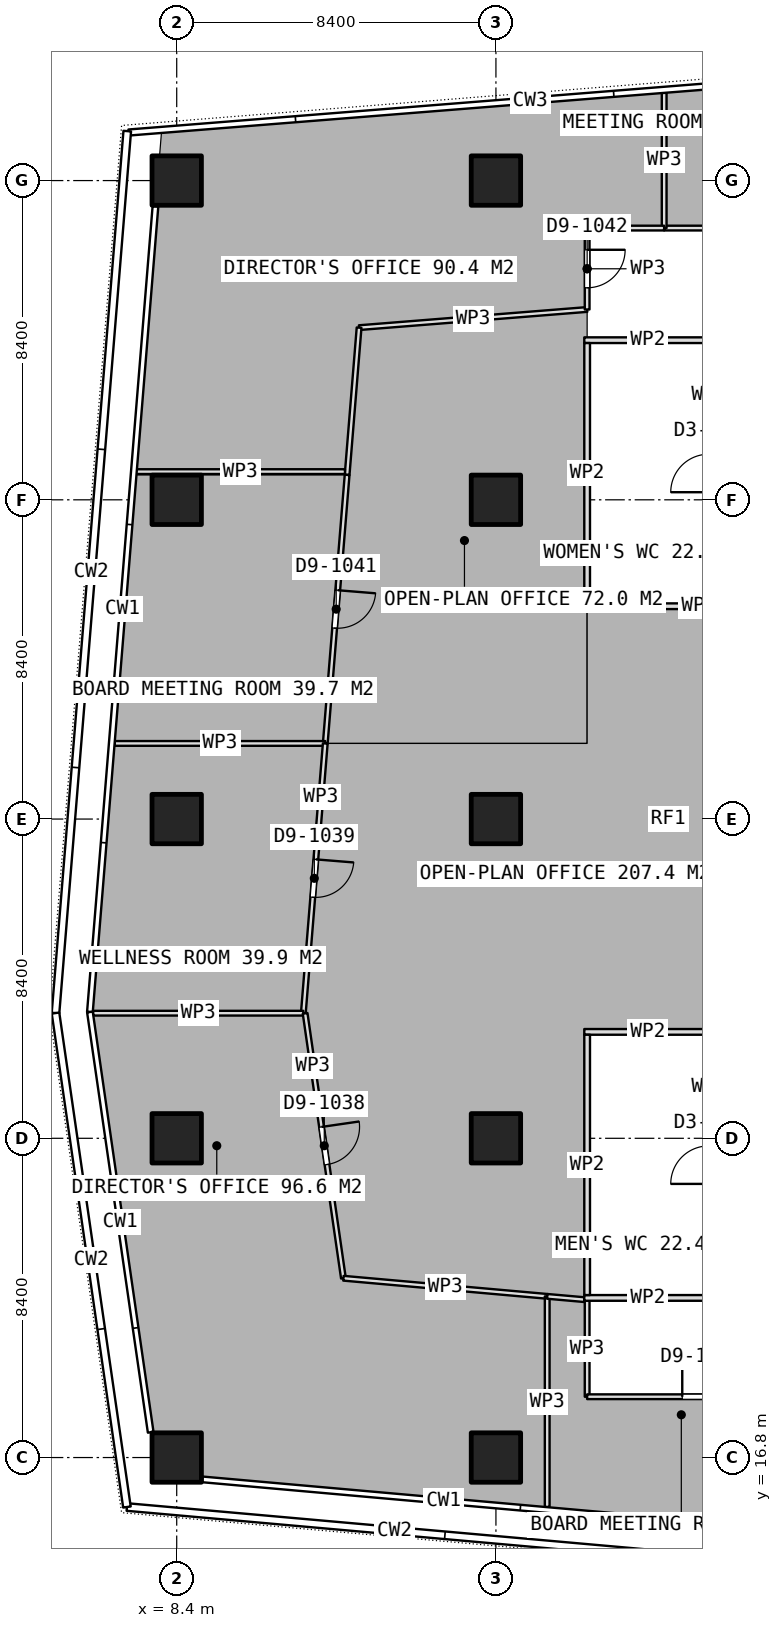
"""IFC4 building model, lengths in metres.
Left out: names, types, materials, properties, quantities, classifications, styles, units other than length and angle.
Written with IfcOpenShell. Run it as: python <this file> out.ifc"""

import sys

from ifc_helpers import new_model, si_unit, direction, frame, frame_2d, origin, origin_2d, place, context, subcontext, project, spatial, rectangle, extrude, element, fill, save


model = new_model("IFC4")
c1 = context("Model", 3, precision=1e-05, world=origin(), true_north=direction((0.0, 1.0)))
c2 = subcontext(c1, "Body", "Model", "MODEL_VIEW")
j1 = project(units=[si_unit("LENGTHUNIT", "METRE"), si_unit("PLANEANGLEUNIT", "RADIAN")], contexts=[c1])
p1 = place(None, origin())
s1 = spatial("IfcSite", under=j1, at=p1, CompositionType="ELEMENT")
p2 = place(p1, origin())
s2 = spatial("IfcBuilding", under=s1, at=p2, CompositionType="ELEMENT")
p3 = place(p2, frame((0.0, 0.0, 280.1)))
s3 = spatial("IfcBuildingStorey", under=s2, at=p3, CompositionType="ELEMENT", Elevation=280.1)
for number, where, z_axis, x_axis in (
    (1, (8.4, 16.8, 0.0), (0.0, 0.0, 1.0), (1.0, 0.0, 0.0)),
    (2, (8.4, 25.2, 0.0), (0.0, 0.0, 1.0), (1.0, 0.0, 0.0)),
    (3, (8.4, 33.6, 0.0), (0.0, 0.0, 1.0), (1.0, 0.0, 0.0)),
    (4, (8.4, 42.0, 0.0), (0.0, 0.0, 1.0), (1.0, 0.0, 0.0)),
    (5, (8.4, 50.4, 0.0), (0.0, 0.0, 1.0), (1.0, 0.0, 0.0)),
    (6, (16.8, 16.8, 0.0), (0.0, 0.0, 1.0), (1.0, 0.0, 0.0)),
    (7, (16.8, 25.2, 0.0), (0.0, 0.0, 1.0), (1.0, 0.0, 0.0)),
    (8, (16.8, 33.6, 0.0), (0.0, 0.0, 1.0), (1.0, 0.0, 0.0)),
    (9, (16.8, 42.0, 0.0), (0.0, 0.0, 1.0), (1.0, 0.0, 0.0)),
    (10, (16.8, 50.4, 0.0), (0.0, 0.0, 1.0), (1.0, 0.0, 0.0)),
):
    element("IfcColumn", number, at=place(p3, frame(where, z_axis=z_axis, x_axis=x_axis)), inside=s3, PredefinedType="COLUMN", context=c2, shape_type="SweptSolid", body=[
        extrude(rectangle(XDim=1.3, YDim=1.3, at=origin_2d()), origin(), (0.0, 0.0, 1.0), 3.75),
    ])
for number, where, z_axis, x_axis in (
    (11, (19.125, 39.2, 0.0), (0.0, 0.0, 1.0), (1.0, 0.0, 0.0)),
    (12, (19.125, 46.2, 0.0), (0.0, 0.0, 1.0), (1.0, 0.0, 0.0)),
):
    element("IfcWall", number, at=place(p3, frame(where, z_axis=z_axis, x_axis=x_axis)), inside=s3, PredefinedType="PARTITIONING", context=c2, shape_type="SweptSolid", body=[
        extrude(rectangle(XDim=3.35, YDim=0.15, at=frame_2d((1.675, 0.0))), origin(), (0.0, 0.0, 1.0), 3.5),
    ])
p4 = place(p3, frame((19.2, 39.275, 0.0), z_axis=(0.0, 0.0, 1.0), x_axis=(0.0, 1.0, 0.0)))
e13 = element("IfcWall", 13, at=p4, inside=s3, PredefinedType="PARTITIONING", context=c2, shape_type="SweptSolid", body=[
    extrude(rectangle(XDim=6.85, YDim=0.15, at=frame_2d((3.425, 0.0))), origin(), (0.0, 0.0, 1.0), 3.5),
])
for number, where, z_axis, x_axis in (
    (14, (19.125, 21.0, 0.0), (0.0, 0.0, 1.0), (1.0, 0.0, 0.0)),
    (15, (19.125, 28.0, 0.0), (0.0, 0.0, 1.0), (1.0, 0.0, 0.0)),
):
    element("IfcWall", number, at=place(p3, frame(where, z_axis=z_axis, x_axis=x_axis)), inside=s3, PredefinedType="PARTITIONING", context=c2, shape_type="SweptSolid", body=[
        extrude(rectangle(XDim=3.35, YDim=0.15, at=frame_2d((1.675, 0.0))), origin(), (0.0, 0.0, 1.0), 3.5),
    ])
p5 = place(p3, frame((19.2, 21.075, 0.0), z_axis=(0.0, 0.0, 1.0), x_axis=(0.0, 1.0, 0.0)))
e16 = element("IfcWall", 16, at=p5, inside=s3, PredefinedType="PARTITIONING", context=c2, shape_type="SweptSolid", body=[
    extrude(rectangle(XDim=6.85, YDim=0.15, at=frame_2d((3.425, 0.0))), origin(), (0.0, 0.0, 1.0), 3.5),
])
p6 = place(p3, frame((25.205, 49.15, 0.0), z_axis=(0.0, 0.0, 1.0), x_axis=(-1.0, 0.0, 0.0)))
e17 = element("IfcWall", 17, at=p6, inside=s3, PredefinedType="PARTITIONING", context=c2, shape_type="SweptSolid", body=[
    extrude(rectangle(XDim=3.978, YDim=0.125, at=frame_2d((1.989, 0.0))), origin(), (0.0, 0.0, 1.0), 3.5),
])
p7 = place(p3, frame((21.227, 49.15, 0.0), z_axis=(0.0, 0.0, 1.0), x_axis=(0.0, 1.0, 0.0)))
e18 = element("IfcWall", 18, at=p7, inside=s3, PredefinedType="PARTITIONING", context=c2, shape_type="SweptSolid", body=[
    extrude(rectangle(XDim=3.558, YDim=0.125, at=frame_2d((1.779, 0.0))), origin(), (0.0, 0.0, 1.0), 3.5),
])
p8 = place(p3, frame((19.2, 47.008, 0.0), z_axis=(0.0, 0.0, 1.0), x_axis=(-0.996842300725, -0.079406721921, 0.0)))
e19 = element("IfcWall", 19, at=p8, inside=s3, PredefinedType="PARTITIONING", context=c2, shape_type="SweptSolid", body=[
    extrude(rectangle(XDim=6.02, YDim=0.125, at=frame_2d((3.01, 0.0))), origin(), (0.0, 0.0, 1.0), 3.5),
])
p9 = place(p3, frame((13.199, 46.53, 0.0), z_axis=(0.0, 0.0, 1.0), x_axis=(-0.081048669132, -0.996710145043, 0.0)))
e20 = element("IfcWall", 20, at=p9, inside=s3, PredefinedType="PARTITIONING", context=c2, shape_type="SweptSolid", body=[
    extrude(rectangle(XDim=3.886, YDim=0.125, at=frame_2d((1.943, 0.0))), origin(), (0.0, 0.0, 1.0), 3.5),
])
p10 = place(p3, frame((12.828, 42.742, 0.0), z_axis=(0.0, 0.0, 1.0), x_axis=(-1.0, 0.0, 0.0)))
e21 = element("IfcWall", 21, at=p10, inside=s3, PredefinedType="PARTITIONING", context=c2, shape_type="SweptSolid", body=[
    extrude(rectangle(XDim=5.505, YDim=0.125, at=frame_2d((2.752, 0.0))), origin(), (0.0, 0.0, 1.0), 3.5),
])
p11 = place(p3, frame((21.226, 49.15, 0.0), z_axis=(0.0, 0.0, 1.0), x_axis=(-1.0, 0.0, 0.0)))
e22 = element("IfcWall", 22, at=p11, inside=s3, PredefinedType="PARTITIONING", context=c2, shape_type="SweptSolid", body=[
    extrude(rectangle(XDim=2.026, YDim=0.125, at=frame_2d((1.013, 0.0))), origin(), (0.0, 0.0, 1.0), 3.5),
])
p12 = place(p3, frame((19.2, 49.15, 0.0), z_axis=(0.0, 0.0, 1.0), x_axis=(0.0, -1.0, 0.0)))
e23 = element("IfcWall", 23, at=p12, inside=s3, PredefinedType="PARTITIONING", context=c2, shape_type="SweptSolid", body=[
    extrude(rectangle(XDim=2.142, YDim=0.125, at=frame_2d((1.071, 0.0))), origin(), (0.0, 0.0, 1.0), 3.5),
])
p13 = place(p12, frame((0.571, 0.0, 0.0)))
e24 = element("IfcOpeningElement", 24, at=p13, cuts=e23, PredefinedType="OPENING", context=c2, shape_type="SweptSolid", body=[
    extrude(rectangle(XDim=1.0, YDim=2.1, at=frame_2d((0.5, 1.05))), frame((0.0, 0.073, 0.0), z_axis=(0.0, -1.0, 0.0), x_axis=(1.0, 0.0, 0.0)), (0.0, 0.0, 1.0), 0.145),
])
p14 = place(p3, frame((12.884, 42.656, 0.0), z_axis=(0.0, 0.0, 1.0), x_axis=(-0.08110159124, -0.996705840205, 0.0)))
e25 = element("IfcWall", 25, at=p14, inside=s3, PredefinedType="PARTITIONING", context=c2, shape_type="SweptSolid", body=[
    extrude(rectangle(XDim=7.089, YDim=0.125, at=frame_2d((3.545, 0.0))), origin(), (0.0, 0.0, 1.0), 3.5),
])
p15 = place(p14, frame((3.045, 0.0, 0.0)))
e26 = element("IfcOpeningElement", 26, at=p15, cuts=e25, PredefinedType="OPENING", context=c2, shape_type="SweptSolid", body=[
    extrude(rectangle(XDim=1.0, YDim=2.1, at=frame_2d((0.5, 1.05))), frame((0.0, 0.073, 0.0), z_axis=(0.0, -1.0, 0.0), x_axis=(1.0, 0.0, 0.0)), (0.0, 0.0, 1.0), 0.145),
])
p16 = place(p3, frame((12.309, 35.59, 0.0), z_axis=(0.0, 0.0, 1.0), x_axis=(-1.0, 0.0, 0.0)))
e27 = element("IfcWall", 27, at=p16, inside=s3, PredefinedType="PARTITIONING", context=c2, shape_type="SweptSolid", body=[
    extrude(rectangle(XDim=5.538, YDim=0.125, at=frame_2d((2.769, 0.0))), origin(), (0.0, 0.0, 1.0), 3.5),
])
p17 = place(p3, frame((12.309, 35.589, 0.0), z_axis=(0.0, 0.0, 1.0), x_axis=(-0.081053384124, -0.996709761627, 0.0)))
e28 = element("IfcWall", 28, at=p17, inside=s3, PredefinedType="PARTITIONING", context=c2, shape_type="SweptSolid", body=[
    extrude(rectangle(XDim=7.121, YDim=0.125, at=frame_2d((3.56, 0.0))), origin(), (0.0, 0.0, 1.0), 3.5),
])
p18 = place(p17, frame((3.06, 0.0, 0.0)))
e29 = element("IfcOpeningElement", 29, at=p18, cuts=e28, PredefinedType="OPENING", context=c2, shape_type="SweptSolid", body=[
    extrude(rectangle(XDim=1.0, YDim=2.1, at=frame_2d((0.5, 1.05))), frame((0.0, 0.073, 0.0), z_axis=(0.0, -1.0, 0.0), x_axis=(1.0, 0.0, 0.0)), (0.0, 0.0, 1.0), 0.145),
])
p19 = place(p3, frame((11.732, 28.492, 0.0), z_axis=(0.0, 0.0, 1.0), x_axis=(-1.0, 0.0, 0.0)))
e30 = element("IfcWall", 30, at=p19, inside=s3, PredefinedType="PARTITIONING", context=c2, shape_type="SweptSolid", body=[
    extrude(rectangle(XDim=5.531, YDim=0.125, at=frame_2d((2.766, 0.0))), origin(), (0.0, 0.0, 1.0), 3.5),
])
p20 = place(p3, frame((11.779, 28.488, 0.0), z_axis=(0.0, 0.0, 1.0), x_axis=(0.143139230014, -0.989702561799, 0.0)))
e31 = element("IfcWall", 31, at=p20, inside=s3, PredefinedType="PARTITIONING", context=c2, shape_type="SweptSolid", body=[
    extrude(rectangle(XDim=7.042, YDim=0.125, at=frame_2d((3.521, 0.0))), origin(), (0.0, 0.0, 1.0), 3.5),
])
p21 = place(p20, frame((3.02, 0.0, 0.0)))
e32 = element("IfcOpeningElement", 32, at=p21, cuts=e31, PredefinedType="OPENING", context=c2, shape_type="SweptSolid", body=[
    extrude(rectangle(XDim=1.0, YDim=2.1, at=frame_2d((0.5, 1.05))), frame((0.0, 0.073, 0.0), z_axis=(0.0, -1.0, 0.0), x_axis=(1.0, 0.0, 0.0)), (0.0, 0.0, 1.0), 0.145),
])
p22 = place(p3, frame((12.787, 21.518, 0.0), z_axis=(0.0, 0.0, 1.0), x_axis=(0.996065348673, -0.088621787237, 0.0)))
e33 = element("IfcWall", 33, at=p22, inside=s3, PredefinedType="PARTITIONING", context=c2, shape_type="SweptSolid", body=[
    extrude(rectangle(XDim=5.383, YDim=0.125, at=frame_2d((2.691, 0.0))), origin(), (0.0, 0.0, 1.0), 3.5),
])
p23 = place(p3, frame((18.149, 21.041, 0.0), z_axis=(0.0, 0.0, 1.0), x_axis=(0.0, -1.0, 0.0)))
e34 = element("IfcWall", 34, at=p23, inside=s3, PredefinedType="PARTITIONING", context=c2, shape_type="SweptSolid", body=[
    extrude(rectangle(XDim=5.541, YDim=0.125, at=frame_2d((2.771, 0.0))), origin(), (0.0, 0.0, 1.0), 3.5),
])
p24 = place(p3, frame((18.15, 21.041, 0.0), z_axis=(0.0, 0.0, 1.0), x_axis=(0.996138836376, -0.087791905459, 0.0)))
e35 = element("IfcWall", 35, at=p24, inside=s3, PredefinedType="PARTITIONING", context=c2, shape_type="SweptSolid", body=[
    extrude(rectangle(XDim=0.979, YDim=0.125, at=frame_2d((0.489, 0.0))), origin(), (0.0, 0.0, 1.0), 3.5),
])
p25 = place(p3, frame((19.2, 20.925, 0.0), z_axis=(0.0, 0.0, 1.0), x_axis=(0.0, -1.0, 0.0)))
e36 = element("IfcWall", 36, at=p25, inside=s3, PredefinedType="PARTITIONING", context=c2, shape_type="SweptSolid", body=[
    extrude(rectangle(XDim=2.525, YDim=0.125, at=frame_2d((1.263, 0.0))), origin(), (0.0, 0.0, 1.0), 3.5),
])
p26 = place(p3, frame((19.2, 18.4, 0.0), z_axis=(0.0, 0.0, 1.0), x_axis=(1.0, 0.0, 0.0)))
e37 = element("IfcWall", 37, at=p26, inside=s3, PredefinedType="PARTITIONING", context=c2, shape_type="SweptSolid", body=[
    extrude(rectangle(XDim=6.006, YDim=0.125, at=frame_2d((3.003, 0.0))), origin(), (0.0, 0.0, 1.0), 3.5),
])
p27 = place(p26, frame((2.503, 0.0, 0.0)))
e38 = element("IfcOpeningElement", 38, at=p27, cuts=e37, PredefinedType="OPENING", context=c2, shape_type="SweptSolid", body=[
    extrude(rectangle(XDim=1.0, YDim=2.1, at=frame_2d((0.5, 1.05))), frame((0.0, 0.073, 0.0), z_axis=(0.0, -1.0, 0.0), x_axis=(1.0, 0.0, 0.0)), (0.0, 0.0, 1.0), 0.145),
])
p28 = place(p13, origin())
e39 = element("IfcDoor", 39, at=p28, inside=s3, OperationType="SINGLE_SWING_LEFT", PredefinedType="DOOR", context=c2, shape_type="SweptSolid", body=[
    extrude(rectangle(XDim=1.0, YDim=2.1, at=frame_2d((0.5, 1.05))), frame((0.0, 0.025, 0.0), z_axis=(0.0, -1.0, 0.0), x_axis=(1.0, 0.0, 0.0)), (0.0, 0.0, 1.0), 0.05),
])
fill(e24, e39)
p29 = place(p15, origin())
e40 = element("IfcDoor", 40, at=p29, inside=s3, OperationType="SINGLE_SWING_LEFT", PredefinedType="DOOR", context=c2, shape_type="SweptSolid", body=[
    extrude(rectangle(XDim=1.0, YDim=2.1, at=frame_2d((0.5, 1.05))), frame((0.0, 0.025, 0.0), z_axis=(0.0, -1.0, 0.0), x_axis=(1.0, 0.0, 0.0)), (0.0, 0.0, 1.0), 0.05),
])
fill(e26, e40)
p30 = place(p18, origin())
e41 = element("IfcDoor", 41, at=p30, inside=s3, OperationType="SINGLE_SWING_LEFT", PredefinedType="DOOR", context=c2, shape_type="SweptSolid", body=[
    extrude(rectangle(XDim=1.0, YDim=2.1, at=frame_2d((0.5, 1.05))), frame((0.0, 0.025, 0.0), z_axis=(0.0, -1.0, 0.0), x_axis=(1.0, 0.0, 0.0)), (0.0, 0.0, 1.0), 0.05),
])
fill(e29, e41)
p31 = place(p21, origin())
e42 = element("IfcDoor", 42, at=p31, inside=s3, OperationType="SINGLE_SWING_LEFT", PredefinedType="DOOR", context=c2, shape_type="SweptSolid", body=[
    extrude(rectangle(XDim=1.0, YDim=2.1, at=frame_2d((0.5, 1.05))), frame((0.0, 0.025, 0.0), z_axis=(0.0, -1.0, 0.0), x_axis=(1.0, 0.0, 0.0)), (0.0, 0.0, 1.0), 0.05),
])
fill(e32, e42)
p32 = place(p27, origin())
e43 = element("IfcDoor", 43, at=p32, inside=s3, OperationType="SINGLE_SWING_LEFT", PredefinedType="DOOR", context=c2, shape_type="SweptSolid", body=[
    extrude(rectangle(XDim=1.0, YDim=2.1, at=frame_2d((0.5, 1.05))), frame((0.0, 0.025, 0.0), z_axis=(0.0, -1.0, 0.0), x_axis=(1.0, 0.0, 0.0)), (0.0, 0.0, 1.0), 0.05),
])
fill(e38, e43)
save(model, sys.argv[1])
